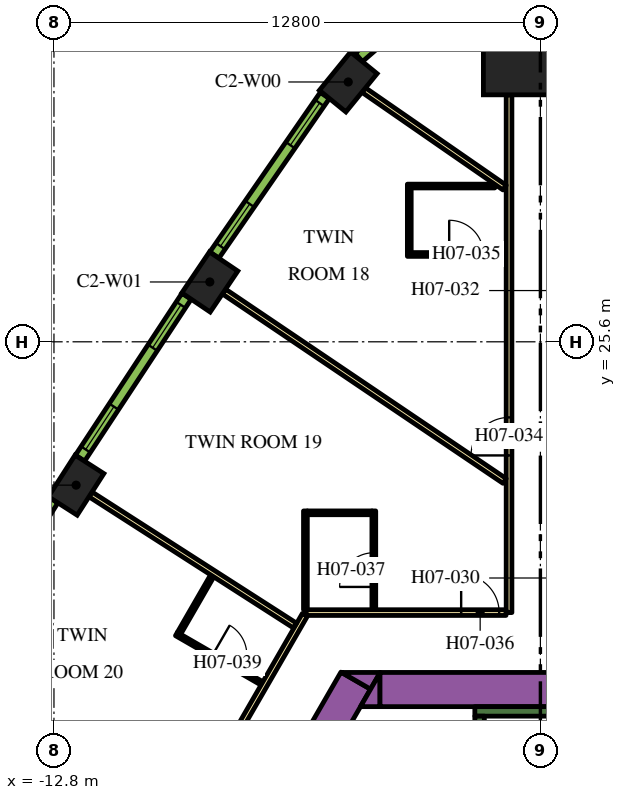
"""IFC4 building model, lengths in metres.
Left out: names, types, materials, properties, quantities, classifications, styles, units other than length and angle.
Written with IfcOpenShell. Run it as: python <this file> out.ifc"""

import sys

from ifc_helpers import new_model, si_unit, direction, frame, frame_2d, origin, origin_2d, place, context, subcontext, project, spatial, polyline, rectangle, outline, extrude, element, fill, save


model = new_model("IFC4")
c1 = context("Model", 3, precision=1e-05, world=origin(), true_north=direction((0.0, 1.0)))
c2 = subcontext(c1, "Body", "Model", "MODEL_VIEW")
j1 = project(units=[si_unit("LENGTHUNIT", "METRE"), si_unit("PLANEANGLEUNIT", "RADIAN")], contexts=[c1])
p1 = place(None, origin())
s1 = spatial("IfcSite", under=j1, at=p1, CompositionType="ELEMENT")
p2 = place(p1, origin())
s2 = spatial("IfcBuilding", under=s1, at=p2, CompositionType="ELEMENT")
p3 = place(p2, frame((0.0, 0.0, 103.2)))
s3 = spatial("IfcBuildingStorey", under=s2, at=p3, CompositionType="ELEMENT", Elevation=103.2)
p4 = place(p3, frame((0.0, 33.598, 0.0), z_axis=(0.0, 0.0, 1.0), x_axis=(0.0, 1.0, 0.0)))
e1 = element("IfcColumn", 1, at=p4, inside=s3, PredefinedType="COLUMN", context=c2, shape_type="SweptSolid", body=[
    extrude(rectangle(XDim=3.0, YDim=3.0, at=origin_2d()), origin(), (0.0, 0.0, 1.0), 3.9),
])
for number, where, z_axis, x_axis in (
    (2, (-5.056, 32.437, 0.0), (0.0, 0.0, 1.0), (-0.632, -0.775, 0.0)),
    (3, (-8.699, 27.174, 0.0), (0.0, 0.0, 1.0), (-0.559, -0.829, 0.0)),
    (4, (-12.217, 21.828, 0.0), (0.0, 0.0, 1.0), (-0.54, -0.842, 0.0)),
):
    element("IfcColumn", number, at=place(p3, frame(where, z_axis=z_axis, x_axis=x_axis)), inside=s3, PredefinedType="COLUMN", context=c2, shape_type="SweptSolid", body=[
        extrude(rectangle(XDim=1.3, YDim=0.9, at=origin_2d()), origin(), (0.0, 0.0, 1.0), 3.9),
    ])
p5 = place(p3, frame((-15.36, -1.503, 0.0), z_axis=(0.0, 0.0, 1.0), x_axis=(0.50000389221, 0.866023156604, 0.0)))
e5 = element("IfcWall", 5, at=p5, inside=s3, PredefinedType="SOLIDWALL", context=c2, shape_type="SweptSolid", body=[
    extrude(rectangle(XDim=21.0, YDim=0.9, at=frame_2d((10.5, 0.0))), origin(), (0.0, 0.0, 1.0), 3.9),
])
p6 = place(p3, origin())
e6 = element("IfcWall", 6, at=p6, inside=s3, PredefinedType="SOLIDWALL", context=c2, shape_type="SweptSolid", body=[
    extrude(outline(polyline([(-4.215, 16.9), (-4.469, 16.46), (-5.231, 16.9), (-4.215, 16.9)])), origin(), (0.0, 0.0, 1.0), 3.9),
])
p7 = place(p3, frame((-4.224, 16.45, 0.0), z_axis=(0.0, 0.0, 1.0), x_axis=(1.0, 0.0, 0.0)))
e7 = element("IfcWall", 7, at=p7, inside=s3, PredefinedType="SOLIDWALL", context=c2, shape_type="SweptSolid", body=[
    extrude(rectangle(XDim=9.488, YDim=0.9, at=frame_2d((4.744, 0.0))), origin(), (0.0, 0.0, 1.0), 3.9),
])
e8 = element("IfcWall", 8, at=p6, inside=s3, PredefinedType="SOLIDWALL", context=c2, shape_type="SweptSolid", body=[
    extrude(outline(polyline([(-4.734, 16.0), (-4.226, 16.88), (-4.226, 16.0), (-4.734, 16.0)])), origin(), (0.0, 0.0, 1.0), 3.9),
])
p8 = place(p3, frame((-1.725, 15.875, 0.0), z_axis=(0.0, 0.0, 1.0), x_axis=(1.0, 0.0, 0.0)))
e9 = element("IfcWall", 9, at=p8, inside=s3, PredefinedType="SOLIDWALL", context=c2, shape_type="SweptSolid", body=[
    extrude(rectangle(XDim=3.45, YDim=0.25, at=frame_2d((1.725, 0.0))), origin(), (0.0, 0.0, 1.0), 3.9),
])
p9 = place(p3, frame((-1.6, 8.7, 0.0), z_axis=(0.0, 0.0, 1.0), x_axis=(0.0, 1.0, 0.0)))
e10 = element("IfcWall", 10, at=p9, inside=s3, PredefinedType="SOLIDWALL", context=c2, shape_type="SweptSolid", body=[
    extrude(rectangle(XDim=7.05, YDim=0.25, at=frame_2d((3.525, 0.0))), origin(), (0.0, 0.0, 1.0), 3.9),
])
p10 = place(p3, frame((-0.825, 18.475, 0.0), z_axis=(0.0, 0.0, 1.0), x_axis=(0.0, 1.0, 0.0)))
e11 = element("IfcWall", 11, at=p10, inside=s3, PredefinedType="PARTITIONING", context=c2, shape_type="SweptSolid", body=[
    extrude(rectangle(XDim=13.623, YDim=0.15, at=frame_2d((6.812, 0.0))), origin(), (0.0, 0.0, 1.0), 2.75),
])
p11 = place(p10, frame((4.135, 0.0, 0.0)))
e12 = element("IfcOpeningElement", 12, at=p11, cuts=e11, PredefinedType="OPENING", context=c2, shape_type="SweptSolid", body=[
    extrude(rectangle(XDim=1.0, YDim=2.1, at=frame_2d((0.5, 1.05))), frame((0.0, 0.085, 0.0), z_axis=(0.0, -1.0, 0.0), x_axis=(1.0, 0.0, 0.0)), (0.0, 0.0, 1.0), 0.17),
])
p12 = place(p3, frame((-6.163, 18.475, 0.0), z_axis=(0.0, 0.0, 1.0), x_axis=(1.0, 0.0, 0.0)))
e13 = element("IfcWall", 13, at=p12, inside=s3, PredefinedType="PARTITIONING", context=c2, shape_type="SweptSolid", body=[
    extrude(rectangle(XDim=5.258, YDim=0.15, at=frame_2d((2.629, 0.0))), origin(), (0.0, 0.0, 1.0), 2.75),
])
p13 = place(p12, frame((4.078, 0.0, 0.0)))
e14 = element("IfcOpeningElement", 14, at=p13, cuts=e13, PredefinedType="OPENING", context=c2, shape_type="SweptSolid", body=[
    extrude(rectangle(XDim=1.0, YDim=2.1, at=frame_2d((0.5, 1.05))), frame((0.0, 0.085, 0.0), z_axis=(0.0, -1.0, 0.0), x_axis=(1.0, 0.0, 0.0)), (0.0, 0.0, 1.0), 0.17),
])
p14 = place(p3, frame((-19.081, -3.9, 0.0), z_axis=(0.0, 0.0, 1.0), x_axis=(0.499998313975, 0.866026377209, 0.0)))
e15 = element("IfcWall", 15, at=p14, inside=s3, PredefinedType="PARTITIONING", context=c2, shape_type="SweptSolid", body=[
    extrude(rectangle(XDim=25.766, YDim=0.15, at=frame_2d((12.883, 0.0))), origin(), (0.0, 0.0, 1.0), 2.75),
])
p15 = place(p14, frame((19.306, 0.0, 0.0)))
e16 = element("IfcOpeningElement", 16, at=p15, cuts=e15, PredefinedType="OPENING", context=c2, shape_type="SweptSolid", body=[
    extrude(rectangle(XDim=1.0, YDim=2.1, at=frame_2d((0.5, 1.05))), frame((0.0, 0.085, 0.0), z_axis=(0.0, -1.0, 0.0), x_axis=(1.0, 0.0, 0.0)), (0.0, 0.0, 1.0), 0.17),
])
p16 = place(p14, frame((17.144, 0.0, 0.0)))
e17 = element("IfcOpeningElement", 17, at=p16, cuts=e15, PredefinedType="OPENING", context=c2, shape_type="SweptSolid", body=[
    extrude(rectangle(XDim=0.9, YDim=2.1, at=frame_2d((0.45, 1.05))), frame((0.0, 0.085, 0.0), z_axis=(0.0, -1.0, 0.0), x_axis=(1.0, 0.0, 0.0)), (0.0, 0.0, 1.0), 0.17),
])
p17 = place(p14, frame((9.955, 0.0, 0.0)))
e18 = element("IfcOpeningElement", 18, at=p17, cuts=e15, PredefinedType="OPENING", context=c2, shape_type="SweptSolid", body=[
    extrude(rectangle(XDim=1.1, YDim=2.1, at=frame_2d((0.55, 1.05))), frame((0.0, 0.085, 0.0), z_axis=(0.0, -1.0, 0.0), x_axis=(1.0, 0.0, 0.0)), (0.0, 0.0, 1.0), 0.17),
])
p18 = place(p14, frame((8.648, 0.0, 0.0)))
e19 = element("IfcOpeningElement", 19, at=p18, cuts=e15, PredefinedType="OPENING", context=c2, shape_type="SweptSolid", body=[
    extrude(rectangle(XDim=1.0, YDim=2.1, at=frame_2d((0.5, 1.05))), frame((0.0, 0.085, 0.0), z_axis=(0.0, -1.0, 0.0), x_axis=(1.0, 0.0, 0.0)), (0.0, 0.0, 1.0), 0.17),
])
p19 = place(p14, frame((1.553, 0.0, 0.0)))
e20 = element("IfcOpeningElement", 20, at=p19, cuts=e15, PredefinedType="OPENING", context=c2, shape_type="SweptSolid", body=[
    extrude(rectangle(XDim=0.9, YDim=2.1, at=frame_2d((0.45, 1.05))), frame((0.0, 0.085, 0.0), z_axis=(0.0, -1.0, 0.0), x_axis=(1.0, 0.0, 0.0)), (0.0, 0.0, 1.0), 0.17),
])
p20 = place(p3, frame((-15.225, 16.167, 0.0), z_axis=(0.0, 0.0, 1.0), x_axis=(0.854088713274, -0.520127359266, 0.0)))
e21 = element("IfcWall", 21, at=p20, inside=s3, PredefinedType="PARTITIONING", context=c2, shape_type="SweptSolid", body=[
    extrude(rectangle(XDim=6.611, YDim=0.15, at=frame_2d((3.305, 0.0))), origin(), (0.0, 0.0, 1.0), 2.75),
])
p21 = place(p3, frame((-11.838, 21.585, 0.0), z_axis=(0.0, 0.0, 1.0), x_axis=(0.841699322813, -0.539946525108, 0.0)))
e22 = element("IfcWall", 22, at=p21, inside=s3, PredefinedType="PARTITIONING", context=c2, shape_type="SweptSolid", body=[
    extrude(rectangle(XDim=6.392, YDim=0.15, at=frame_2d((3.196, 0.0))), origin(), (0.0, 0.0, 1.0), 2.75),
])
p22 = place(p3, frame((-8.326, 26.923, 0.0), z_axis=(0.0, 0.0, 1.0), x_axis=(0.828836601893, -0.5594907393, 0.0)))
e23 = element("IfcWall", 23, at=p22, inside=s3, PredefinedType="PARTITIONING", context=c2, shape_type="SweptSolid", body=[
    extrude(rectangle(XDim=8.909, YDim=0.15, at=frame_2d((4.455, 0.0))), origin(), (0.0, 0.0, 1.0), 2.75),
])
p23 = place(p3, frame((-4.649, 32.223, 0.0), z_axis=(0.0, 0.0, 1.0), x_axis=(0.822262349475, -0.569108626394, 0.0)))
e24 = element("IfcWall", 24, at=p23, inside=s3, PredefinedType="PARTITIONING", context=c2, shape_type="SweptSolid", body=[
    extrude(rectangle(XDim=4.51, YDim=0.15, at=frame_2d((2.255, 0.0))), origin(), (0.0, 0.0, 1.0), 2.75),
])
p24 = place(p3, frame((-3.5, 27.898, 0.0), z_axis=(0.0, 0.0, 1.0), x_axis=(1.0, 0.0, 0.0)))
e25 = element("IfcWall", 25, at=p24, inside=s3, PredefinedType="PARTITIONING", context=c2, shape_type="SweptSolid", body=[
    extrude(rectangle(XDim=2.6, YDim=0.1, at=frame_2d((1.3, 0.0))), origin(), (0.0, 0.0, 1.0), 2.75),
])
p25 = place(p24, frame((1.1, 0.0, 0.0)))
e26 = element("IfcOpeningElement", 26, at=p25, cuts=e25, PredefinedType="OPENING", context=c2, shape_type="SweptSolid", body=[
    extrude(rectangle(XDim=0.9, YDim=2.1, at=frame_2d((0.45, 1.05))), frame((0.0, 0.06, 0.0), z_axis=(0.0, -1.0, 0.0), x_axis=(1.0, 0.0, 0.0)), (0.0, 0.0, 1.0), 0.12),
])
p26 = place(p3, frame((-3.45, 27.948, 0.0), z_axis=(0.0, 0.0, 1.0), x_axis=(0.0, 1.0, 0.0)))
e27 = element("IfcWall", 27, at=p26, inside=s3, PredefinedType="PARTITIONING", context=c2, shape_type="SweptSolid", body=[
    extrude(rectangle(XDim=1.7, YDim=0.1, at=frame_2d((0.85, 0.0))), origin(), (0.0, 0.0, 1.0), 2.75),
])
p27 = place(p3, frame((-1.2, 29.698, 0.0), z_axis=(0.0, 0.0, 1.0), x_axis=(-1.0, 0.0, 0.0)))
e28 = element("IfcWall", 28, at=p27, inside=s3, PredefinedType="PARTITIONING", context=c2, shape_type="SweptSolid", body=[
    extrude(rectangle(XDim=2.3, YDim=0.1, at=frame_2d((1.15, 0.0))), origin(), (0.0, 0.0, 1.0), 2.75),
])
p28 = place(p3, frame((-4.383, 18.55, 0.0), z_axis=(0.0, 0.0, 1.0), x_axis=(0.0, 1.0, 0.0)))
e29 = element("IfcWall", 29, at=p28, inside=s3, PredefinedType="PARTITIONING", context=c2, shape_type="SweptSolid", body=[
    extrude(rectangle(XDim=2.6, YDim=0.1, at=frame_2d((1.3, 0.0))), origin(), (0.0, 0.0, 1.0), 2.75),
])
p29 = place(p28, frame((0.6, 0.0, 0.0)))
e30 = element("IfcOpeningElement", 30, at=p29, cuts=e29, PredefinedType="OPENING", context=c2, shape_type="SweptSolid", body=[
    extrude(rectangle(XDim=0.9, YDim=2.1, at=frame_2d((0.45, 1.05))), frame((0.0, 0.06, 0.0), z_axis=(0.0, -1.0, 0.0), x_axis=(1.0, 0.0, 0.0)), (0.0, 0.0, 1.0), 0.12),
])
p30 = place(p3, frame((-4.433, 21.1, 0.0), z_axis=(0.0, 0.0, 1.0), x_axis=(-1.0, 0.0, 0.0)))
e31 = element("IfcWall", 31, at=p30, inside=s3, PredefinedType="PARTITIONING", context=c2, shape_type="SweptSolid", body=[
    extrude(rectangle(XDim=1.7, YDim=0.1, at=frame_2d((0.85, 0.0))), origin(), (0.0, 0.0, 1.0), 2.75),
])
p31 = place(p3, frame((-6.183, 18.55, 0.0), z_axis=(0.0, 0.0, 1.0), x_axis=(0.0, 1.0, 0.0)))
e32 = element("IfcWall", 32, at=p31, inside=s3, PredefinedType="PARTITIONING", context=c2, shape_type="SweptSolid", body=[
    extrude(rectangle(XDim=2.6, YDim=0.1, at=frame_2d((1.3, 0.0))), origin(), (0.0, 0.0, 1.0), 2.75),
])
p32 = place(p3, frame((-9.578, 17.911, 0.0), z_axis=(0.0, 0.0, 1.0), x_axis=(0.866021400173, -0.500006934395, 0.0)))
e33 = element("IfcWall", 33, at=p32, inside=s3, PredefinedType="PARTITIONING", context=c2, shape_type="SweptSolid", body=[
    extrude(rectangle(XDim=2.6, YDim=0.1, at=frame_2d((1.3, 0.0))), origin(), (0.0, 0.0, 1.0), 2.75),
])
p33 = place(p32, frame((1.1, 0.0, 0.0)))
e34 = element("IfcOpeningElement", 34, at=p33, cuts=e33, PredefinedType="OPENING", context=c2, shape_type="SweptSolid", body=[
    extrude(rectangle(XDim=0.9, YDim=2.1, at=frame_2d((0.45, 1.05))), frame((0.0, 0.06, 0.0), z_axis=(0.0, -1.0, 0.0), x_axis=(1.0, 0.0, 0.0)), (0.0, 0.0, 1.0), 0.12),
])
p34 = place(p3, frame((-9.51, 17.929, 0.0), z_axis=(0.0, 0.0, 1.0), x_axis=(0.500062521093, 0.865989304205, 0.0)))
e35 = element("IfcWall", 35, at=p34, inside=s3, PredefinedType="PARTITIONING", context=c2, shape_type="SweptSolid", body=[
    extrude(rectangle(XDim=1.74, YDim=0.1, at=frame_2d((0.87, 0.0))), origin(), (0.0, 0.0, 1.0), 2.75),
])
p35 = place(p3, frame((-3.405, 34.275, 0.0), z_axis=(0.0, 0.0, 1.0), x_axis=(-0.754882764627, -0.655859749999, 0.0)))
e36 = element("IfcWall", 36, at=p35, inside=s3, PredefinedType="SOLIDWALL", context=c2, shape_type="SweptSolid", body=[
    extrude(rectangle(XDim=1.82, YDim=0.29, at=frame_2d((0.91, 0.0))), origin(), (0.0, 0.0, 1.0), 3.65),
])
p36 = place(p35, frame((0.46, 0.0, 0.9)))
e37 = element("IfcOpeningElement", 37, at=p36, cuts=e36, PredefinedType="OPENING", context=c2, shape_type="SweptSolid", body=[
    extrude(rectangle(XDim=0.9, YDim=2.15, at=frame_2d((0.45, 1.075))), frame((0.0, 0.155, 0.0), z_axis=(0.0, -1.0, 0.0), x_axis=(1.0, 0.0, 0.0)), (0.0, 0.0, 1.0), 0.31),
])
p37 = place(p3, frame((-5.673, 32.081, 0.0), z_axis=(0.0, 0.0, 1.0), x_axis=(-0.569113019126, -0.822259309136, 0.0)))
e38 = element("IfcWall", 38, at=p37, inside=s3, PredefinedType="SOLIDWALL", context=c2, shape_type="SweptSolid", body=[
    extrude(rectangle(XDim=5.107, YDim=0.29, at=frame_2d((2.553, 0.0))), origin(), (0.0, 0.0, 1.0), 3.65),
])
p38 = place(p37, frame((0.24, 0.0, 0.9)))
e39 = element("IfcOpeningElement", 39, at=p38, cuts=e38, PredefinedType="OPENING", context=c2, shape_type="SweptSolid", body=[
    extrude(rectangle(XDim=1.35, YDim=2.15, at=frame_2d((0.675, 1.075))), frame((0.0, 0.155, 0.0), z_axis=(0.0, -1.0, 0.0), x_axis=(1.0, 0.0, 0.0)), (0.0, 0.0, 1.0), 0.31),
])
p39 = place(p37, frame((3.471, 0.0, 0.9)))
e40 = element("IfcOpeningElement", 40, at=p39, cuts=e38, PredefinedType="OPENING", context=c2, shape_type="SweptSolid", body=[
    extrude(rectangle(XDim=1.35, YDim=2.15, at=frame_2d((0.675, 1.075))), frame((0.0, 0.155, 0.0), z_axis=(0.0, -1.0, 0.0), x_axis=(1.0, 0.0, 0.0)), (0.0, 0.0, 1.0), 0.31),
])
p40 = place(p3, frame((-9.311, 26.799, 0.0), z_axis=(0.0, 0.0, 1.0), x_axis=(-0.549741341923, -0.835334937005, 0.0)))
e41 = element("IfcWall", 41, at=p40, inside=s3, PredefinedType="SOLIDWALL", context=c2, shape_type="SweptSolid", body=[
    extrude(rectangle(XDim=5.1, YDim=0.29, at=frame_2d((2.55, 0.0))), origin(), (0.0, 0.0, 1.0), 3.65),
])
p41 = place(p40, frame((0.273, 0.0, 0.9)))
e42 = element("IfcOpeningElement", 42, at=p41, cuts=e41, PredefinedType="OPENING", context=c2, shape_type="SweptSolid", body=[
    extrude(rectangle(XDim=1.35, YDim=2.15, at=frame_2d((0.675, 1.075))), frame((0.0, 0.155, 0.0), z_axis=(0.0, -1.0, 0.0), x_axis=(1.0, 0.0, 0.0)), (0.0, 0.0, 1.0), 0.31),
])
p42 = place(p40, frame((3.478, 0.0, 0.9)))
e43 = element("IfcOpeningElement", 43, at=p42, cuts=e41, PredefinedType="OPENING", context=c2, shape_type="SweptSolid", body=[
    extrude(rectangle(XDim=1.35, YDim=2.15, at=frame_2d((0.675, 1.075))), frame((0.0, 0.155, 0.0), z_axis=(0.0, -1.0, 0.0), x_axis=(1.0, 0.0, 0.0)), (0.0, 0.0, 1.0), 0.31),
])
p43 = place(p3, frame((-12.82, 21.439, 0.0), z_axis=(0.0, 0.0, 1.0), x_axis=(-0.530072082134, -0.847952585787, 0.0)))
e44 = element("IfcWall", 44, at=p43, inside=s3, PredefinedType="SOLIDWALL", context=c2, shape_type="SweptSolid", body=[
    extrude(rectangle(XDim=5.1, YDim=0.29, at=frame_2d((2.55, 0.0))), origin(), (0.0, 0.0, 1.0), 3.65),
])
p44 = place(p43, frame((0.273, 0.0, 0.9)))
e45 = element("IfcOpeningElement", 45, at=p44, cuts=e44, PredefinedType="OPENING", context=c2, shape_type="SweptSolid", body=[
    extrude(rectangle(XDim=1.35, YDim=2.15, at=frame_2d((0.675, 1.075))), frame((0.0, 0.155, 0.0), z_axis=(0.0, -1.0, 0.0), x_axis=(1.0, 0.0, 0.0)), (0.0, 0.0, 1.0), 0.31),
])
p45 = place(p43, frame((3.478, 0.0, 0.9)))
e46 = element("IfcOpeningElement", 46, at=p45, cuts=e44, PredefinedType="OPENING", context=c2, shape_type="SweptSolid", body=[
    extrude(rectangle(XDim=1.35, YDim=2.15, at=frame_2d((0.675, 1.075))), frame((0.0, 0.155, 0.0), z_axis=(0.0, -1.0, 0.0), x_axis=(1.0, 0.0, 0.0)), (0.0, 0.0, 1.0), 0.31),
])
p46 = place(p11, origin())
e47 = element("IfcDoor", 47, at=p46, inside=s3, OperationType="SINGLE_SWING_LEFT", PredefinedType="DOOR", context=c2, shape_type="SweptSolid", body=[
    extrude(rectangle(XDim=1.0, YDim=2.1, at=frame_2d((0.5, 1.05))), frame((0.0, 0.025, 0.0), z_axis=(0.0, -1.0, 0.0), x_axis=(1.0, 0.0, 0.0)), (0.0, 0.0, 1.0), 0.05),
])
fill(e12, e47)
p47 = place(p25, origin())
e48 = element("IfcDoor", 48, at=p47, inside=s3, OperationType="SINGLE_SWING_RIGHT", PredefinedType="DOOR", context=c2, shape_type="SweptSolid", body=[
    extrude(rectangle(XDim=0.9, YDim=2.1, at=frame_2d((0.45, 1.05))), frame((0.0, 0.025, 0.0), z_axis=(0.0, -1.0, 0.0), x_axis=(1.0, 0.0, 0.0)), (0.0, 0.0, 1.0), 0.05),
])
fill(e26, e48)
p48 = place(p13, origin())
e49 = element("IfcDoor", 49, at=p48, inside=s3, OperationType="SINGLE_SWING_RIGHT", PredefinedType="DOOR", context=c2, shape_type="SweptSolid", body=[
    extrude(rectangle(XDim=1.0, YDim=2.1, at=frame_2d((0.5, 1.05))), frame((0.0, 0.025, 0.0), z_axis=(0.0, -1.0, 0.0), x_axis=(1.0, 0.0, 0.0)), (0.0, 0.0, 1.0), 0.05),
])
fill(e14, e49)
p49 = place(p29, origin())
e50 = element("IfcDoor", 50, at=p49, inside=s3, OperationType="SINGLE_SWING_LEFT", PredefinedType="DOOR", context=c2, shape_type="SweptSolid", body=[
    extrude(rectangle(XDim=0.9, YDim=2.1, at=frame_2d((0.45, 1.05))), frame((0.0, 0.025, 0.0), z_axis=(0.0, -1.0, 0.0), x_axis=(1.0, 0.0, 0.0)), (0.0, 0.0, 1.0), 0.05),
])
fill(e30, e50)
p50 = place(p33, origin())
e51 = element("IfcDoor", 51, at=p50, inside=s3, OperationType="SINGLE_SWING_LEFT", PredefinedType="DOOR", context=c2, shape_type="SweptSolid", body=[
    extrude(rectangle(XDim=0.9, YDim=2.1, at=frame_2d((0.45, 1.05))), frame((0.0, 0.025, 0.0), z_axis=(0.0, -1.0, 0.0), x_axis=(1.0, 0.0, 0.0)), (0.0, 0.0, 1.0), 0.05),
])
fill(e34, e51)
p51 = place(p38, origin())
e52 = element("IfcWindow", 52, at=p51, inside=s3, PartitioningType="DOUBLE_PANEL_VERTICAL", PredefinedType="WINDOW", context=c2, shape_type="SweptSolid", body=[
    extrude(rectangle(XDim=1.35, YDim=2.15, at=frame_2d((0.675, 1.075))), frame((0.0, 0.015, 0.0), z_axis=(0.0, -1.0, 0.0), x_axis=(1.0, 0.0, 0.0)), (0.0, 0.0, 1.0), 0.06),
])
fill(e39, e52)
p52 = place(p39, origin())
e53 = element("IfcWindow", 53, at=p52, inside=s3, PartitioningType="DOUBLE_PANEL_VERTICAL", PredefinedType="WINDOW", context=c2, shape_type="SweptSolid", body=[
    extrude(rectangle(XDim=1.35, YDim=2.15, at=frame_2d((0.675, 1.075))), frame((0.0, 0.015, 0.0), z_axis=(0.0, -1.0, 0.0), x_axis=(1.0, 0.0, 0.0)), (0.0, 0.0, 1.0), 0.06),
])
fill(e40, e53)
p53 = place(p41, origin())
e54 = element("IfcWindow", 54, at=p53, inside=s3, PartitioningType="DOUBLE_PANEL_VERTICAL", PredefinedType="WINDOW", context=c2, shape_type="SweptSolid", body=[
    extrude(rectangle(XDim=1.35, YDim=2.15, at=frame_2d((0.675, 1.075))), frame((0.0, 0.015, 0.0), z_axis=(0.0, -1.0, 0.0), x_axis=(1.0, 0.0, 0.0)), (0.0, 0.0, 1.0), 0.06),
])
fill(e42, e54)
p54 = place(p42, origin())
e55 = element("IfcWindow", 55, at=p54, inside=s3, PartitioningType="DOUBLE_PANEL_VERTICAL", PredefinedType="WINDOW", context=c2, shape_type="SweptSolid", body=[
    extrude(rectangle(XDim=1.35, YDim=2.15, at=frame_2d((0.675, 1.075))), frame((0.0, 0.015, 0.0), z_axis=(0.0, -1.0, 0.0), x_axis=(1.0, 0.0, 0.0)), (0.0, 0.0, 1.0), 0.06),
])
fill(e43, e55)
save(model, sys.argv[1])
